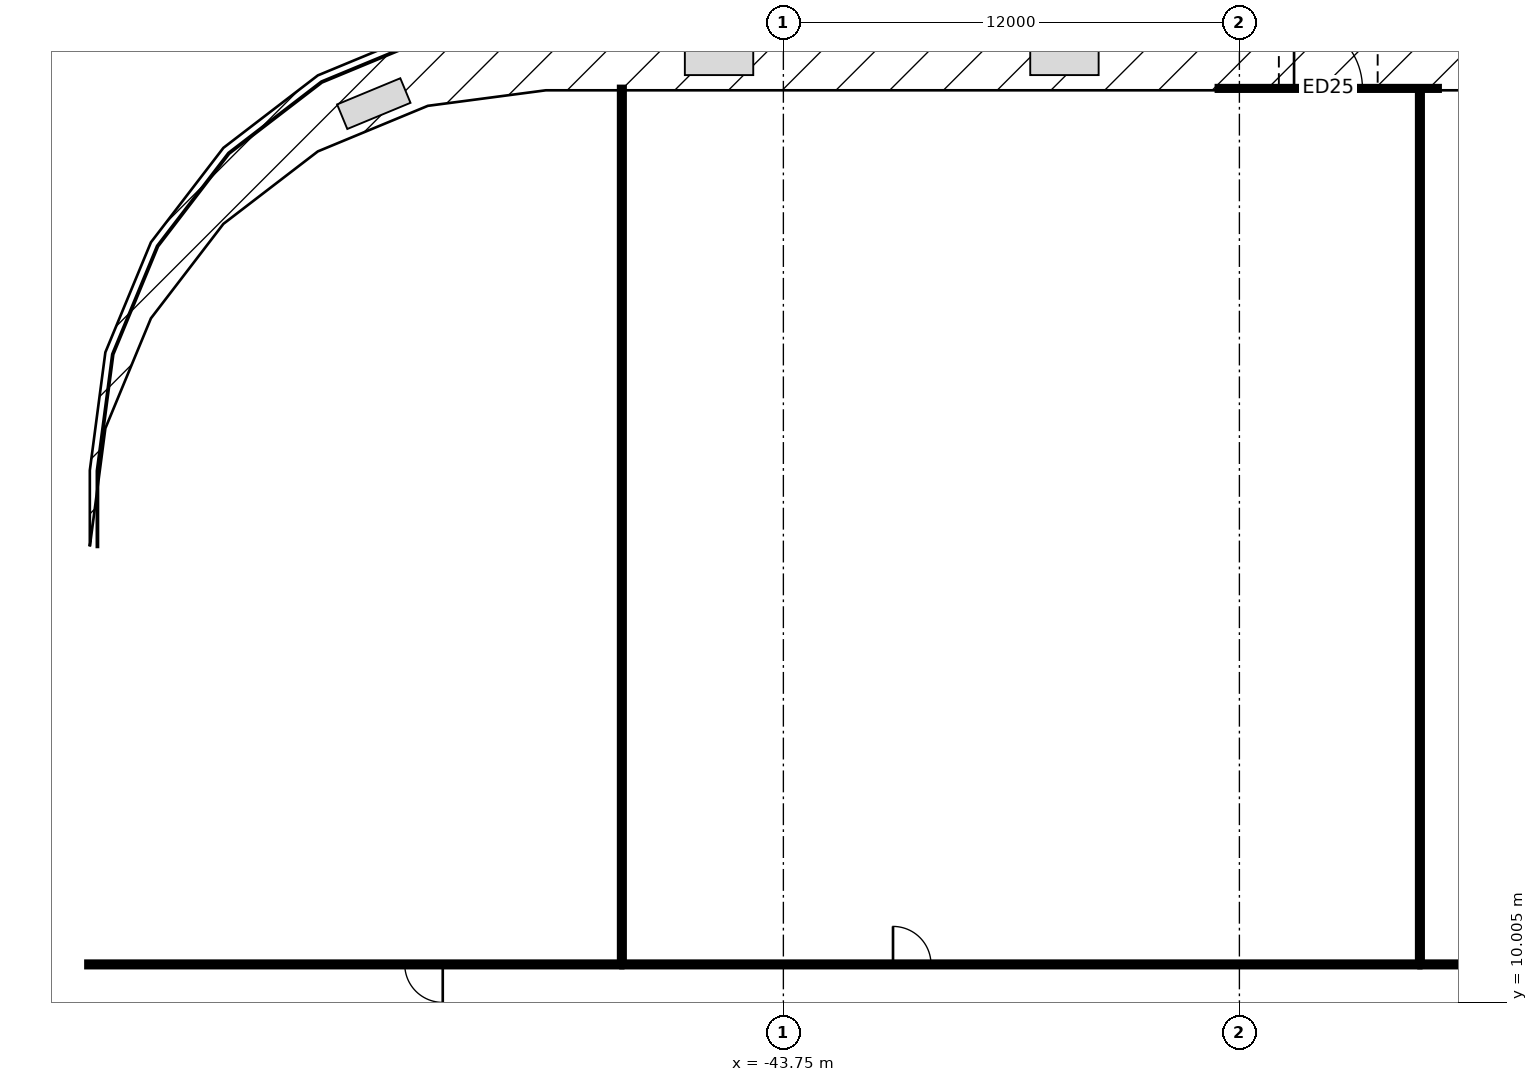
"""IFC4 building model, lengths in metres.
Left out: names, types, materials, properties, quantities, classifications, styles, units other than length and angle.
Written with IfcOpenShell. Run it as: python <this file> out.ifc"""

import sys

from ifc_helpers import new_model, si_unit, direction, frame, frame_2d, origin, origin_2d, place, context, subcontext, project, spatial, rectangle, hollow_rectangle, circle, extrude, element, fill, save


model = new_model("IFC4")
c1 = context("Model", 3, precision=1e-05, world=origin(), true_north=direction((0.0, 1.0)))
c2 = subcontext(c1, "Body", "Model", "MODEL_VIEW")
j1 = project(units=[si_unit("LENGTHUNIT", "METRE"), si_unit("PLANEANGLEUNIT", "RADIAN")], contexts=[c1])
p1 = place(None, origin())
s1 = spatial("IfcSite", under=j1, at=p1, CompositionType="ELEMENT")
p2 = place(p1, origin())
s2 = spatial("IfcBuilding", under=s1, at=p2, CompositionType="ELEMENT")
p3 = place(p2, frame((0.0, 0.0, 7.0)))
s3 = spatial("IfcBuildingStorey", under=s2, at=p3, CompositionType="ELEMENT", Elevation=7.0)
for number, where, z_axis, x_axis in (
    (1, (-59.4, 21.0, 0.0), (0.0, 0.0, 1.0), (1.0, 0.0, 0.0)),
    (2, (-54.6, 12.6, 0.0), (0.0, 0.0, 1.0), (1.0, 0.0, 0.0)),
    (3, (-54.6, 21.0, 0.0), (0.0, 0.0, 1.0), (1.0, 0.0, 0.0)),
    (4, (-54.6, 27.4, 0.0), (0.0, 0.0, 1.0), (1.0, 0.0, 0.0)),
    (5, (-37.8, 27.4, 0.0), (0.0, 0.0, 1.0), (1.0, 0.0, 0.0)),
):
    element("IfcColumn", number, at=place(p3, frame(where, z_axis=z_axis, x_axis=x_axis)), inside=s3, PredefinedType="COLUMN", context=c2, shape_type="SweptSolid", body=[
        extrude(circle(Radius=0.6, at=origin_2d()), origin(), (0.0, 0.0, 1.0), 5.0),
    ])
for number, where, z_axis, x_axis in (
    (6, (-31.75, 21.904, 0.0), (0.0, 0.0, 1.0), (0.0, 1.0, 0.0)),
    (7, (-42.961, 19.418, 0.0), (0.0, 0.0, 1.0), (-0.5, 0.866, 0.0)),
):
    element("IfcColumn", number, at=place(p3, frame(where, z_axis=z_axis, x_axis=x_axis)), inside=s3, PredefinedType="COLUMN", context=c2, shape_type="SweptSolid", body=[
        extrude(hollow_rectangle(XDim=1.5, YDim=1.5, WallThickness=0.07, at=origin_2d()), origin(), (0.0, 0.0, 1.0), 5.0),
    ])
p4 = place(p3, frame((-32.333, 34.05, 0.0), z_axis=(0.0, 0.0, 1.0), x_axis=(1.0, 0.0, 0.0)))
e8 = element("IfcWall", 8, at=p4, inside=s3, PredefinedType="STANDARD", context=c2, shape_type="SweptSolid", body=[
    extrude(rectangle(XDim=5.843, YDim=0.1, at=frame_2d((2.921, 0.0))), origin(), (0.0, 0.0, 1.0), 5.0),
])
p5 = place(p4, frame((2.021, 0.0, 0.0)))
e9 = element("IfcOpeningElement", 9, at=p5, cuts=e8, PredefinedType="OPENING", context=c2, shape_type="SweptSolid", body=[
    extrude(rectangle(XDim=1.8, YDim=2.4, at=frame_2d((0.9, 1.2))), frame((0.0, 0.06, 0.0), z_axis=(0.0, -1.0, 0.0), x_axis=(1.0, 0.0, 0.0)), (0.0, 0.0, 1.0), 0.12),
])
p6 = place(p3, frame((-48.0, 11.0, 0.0), z_axis=(0.0, 0.0, 1.0), x_axis=(-1.0, 0.0, 0.0)))
e10 = element("IfcWall", 10, at=p6, inside=s3, PredefinedType="PARTITIONING", context=c2, shape_type="SweptSolid", body=[
    extrude(rectangle(XDim=14.08, YDim=0.125, at=frame_2d((7.04, 0.0))), origin(), (0.0, 0.0, 1.0), 3.762),
])
p7 = place(p6, frame((4.713, 0.0, 0.0)))
e11 = element("IfcOpeningElement", 11, at=p7, cuts=e10, PredefinedType="OPENING", context=c2, shape_type="SweptSolid", body=[
    extrude(rectangle(XDim=1.0, YDim=2.1, at=frame_2d((0.5, 1.05))), frame((0.0, 0.073, 0.0), z_axis=(0.0, -1.0, 0.0), x_axis=(1.0, 0.0, 0.0)), (0.0, 0.0, 1.0), 0.145),
])
p8 = place(p3, frame((-27.0, 11.0, 0.0), z_axis=(0.0, 0.0, 1.0), x_axis=(-1.0, 0.0, 0.0)))
e12 = element("IfcWall", 12, at=p8, inside=s3, PredefinedType="PARTITIONING", context=c2, shape_type="SweptSolid", body=[
    extrude(rectangle(XDim=21.0, YDim=0.125, at=frame_2d((10.5, 0.0))), origin(), (0.0, 0.0, 1.0), 3.996),
])
p9 = place(p8, frame((12.865, 0.0, 0.0)))
e13 = element("IfcOpeningElement", 13, at=p9, cuts=e12, PredefinedType="OPENING", context=c2, shape_type="SweptSolid", body=[
    extrude(rectangle(XDim=1.0, YDim=2.1, at=frame_2d((0.5, 1.05))), frame((0.0, 0.073, 0.0), z_axis=(0.0, -1.0, 0.0), x_axis=(1.0, 0.0, 0.0)), (0.0, 0.0, 1.0), 0.145),
])
p10 = place(p3, frame((-18.0, 11.0, 0.0), z_axis=(0.0, 0.0, 1.0), x_axis=(-1.0, 0.0, 0.0)))
e14 = element("IfcWall", 14, at=p10, inside=s3, PredefinedType="PARTITIONING", context=c2, shape_type="SweptSolid", body=[
    extrude(rectangle(XDim=9.0, YDim=0.125, at=frame_2d((4.5, 0.0))), origin(), (0.0, 0.0, 1.0), 3.996),
])
p11 = place(p10, frame((4.0, 0.0, 0.0)))
e15 = element("IfcOpeningElement", 15, at=p11, cuts=e14, PredefinedType="OPENING", context=c2, shape_type="SweptSolid", body=[
    extrude(rectangle(XDim=1.0, YDim=2.1, at=frame_2d((0.5, 1.05))), frame((0.0, 0.073, 0.0), z_axis=(0.0, -1.0, 0.0), x_axis=(1.0, 0.0, 0.0)), (0.0, 0.0, 1.0), 0.145),
])
for number, where, z_axis, x_axis in (
    (16, (-48.0, 11.062, 0.0), (0.0, 0.0, 1.0), (0.0, 1.0, 0.0)),
    (17, (-27.0, 11.062, 0.0), (0.0, 0.0, 1.0), (0.0, 1.0, 0.0)),
):
    element("IfcWall", number, at=place(p3, frame(where, z_axis=z_axis, x_axis=x_axis)), inside=s3, PredefinedType="PARTITIONING", context=c2, shape_type="SweptSolid", body=[
        extrude(rectangle(XDim=23.018, YDim=0.125, at=frame_2d((11.509, 0.0))), origin(), (0.0, 0.0, 1.0), 3.48),
    ])
p12 = place(p5, origin())
e18 = element("IfcDoor", 18, at=p12, inside=s3, OperationType="SINGLE_SWING_LEFT", PredefinedType="DOOR", context=c2, shape_type="SweptSolid", body=[
    extrude(rectangle(XDim=1.8, YDim=2.4, at=frame_2d((0.9, 1.2))), frame((0.0, 0.025, 0.0), z_axis=(0.0, -1.0, 0.0), x_axis=(1.0, 0.0, 0.0)), (0.0, 0.0, 1.0), 0.05),
])
fill(e9, e18)
p13 = place(p7, origin())
e19 = element("IfcDoor", 19, at=p13, inside=s3, OperationType="SINGLE_SWING_LEFT", PredefinedType="DOOR", context=c2, shape_type="SweptSolid", body=[
    extrude(rectangle(XDim=1.0, YDim=2.1, at=frame_2d((0.5, 1.05))), frame((0.0, 0.025, 0.0), z_axis=(0.0, -1.0, 0.0), x_axis=(1.0, 0.0, 0.0)), (0.0, 0.0, 1.0), 0.05),
])
fill(e11, e19)
p14 = place(p9, origin())
e20 = element("IfcDoor", 20, at=p14, inside=s3, OperationType="SINGLE_SWING_RIGHT", PredefinedType="DOOR", context=c2, shape_type="SweptSolid", body=[
    extrude(rectangle(XDim=1.0, YDim=2.1, at=frame_2d((0.5, 1.05))), frame((0.0, 0.025, 0.0), z_axis=(0.0, -1.0, 0.0), x_axis=(1.0, 0.0, 0.0)), (0.0, 0.0, 1.0), 0.05),
])
fill(e13, e20)
save(model, sys.argv[1])
